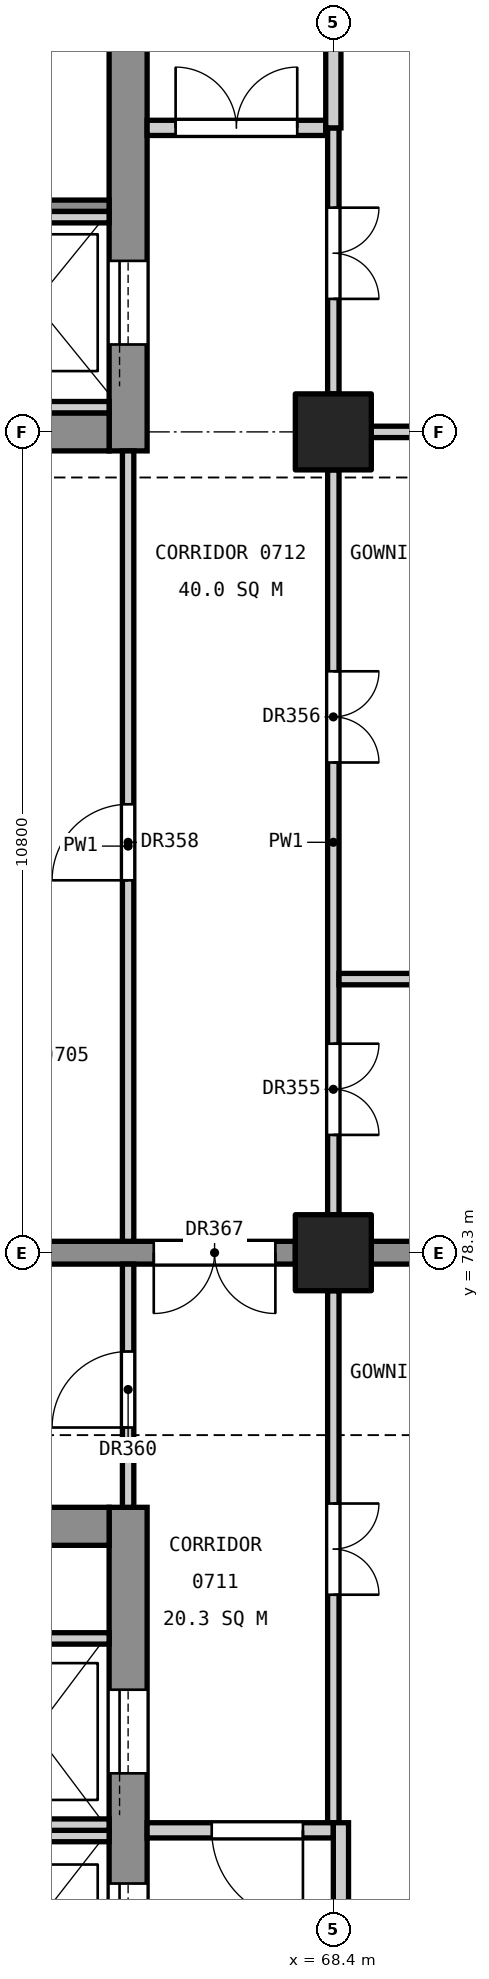
"""IFC4 building model, lengths in metres.
Left out: names, types, materials, properties, quantities, classifications, styles, units other than length and angle.
Written with IfcOpenShell. Run it as: python <this file> out.ifc"""

import sys

from ifc_helpers import new_model, si_unit, direction, frame, frame_2d, origin, origin_2d, place, context, subcontext, project, spatial, rectangle, extrude, element, fill, save


model = new_model("IFC4")
c1 = context("Model", 3, precision=1e-05, world=origin(), true_north=direction((0.0, 1.0)))
c2 = subcontext(c1, "Body", "Model", "MODEL_VIEW")
j1 = project(units=[si_unit("LENGTHUNIT", "METRE"), si_unit("PLANEANGLEUNIT", "RADIAN")], contexts=[c1])
p1 = place(None, origin())
s1 = spatial("IfcSite", under=j1, at=p1, CompositionType="ELEMENT")
p2 = place(p1, origin())
s2 = spatial("IfcBuilding", under=s1, at=p2, CompositionType="ELEMENT")
p3 = place(p2, frame((0.0, 0.0, 36.6)))
s3 = spatial("IfcBuildingStorey", under=s2, at=p3, CompositionType="ELEMENT", Elevation=36.6)
for number, where, z_axis, x_axis in (
    (1, (68.4, 78.3, 0.0), (0.0, 0.0, 1.0), (1.0, 0.0, 0.0)),
    (2, (68.4, 89.1, 0.0), (0.0, 0.0, 1.0), (1.0, 0.0, 0.0)),
):
    element("IfcColumn", number, at=place(p3, frame(where, z_axis=z_axis, x_axis=x_axis)), inside=s3, PredefinedType="COLUMN", context=c2, shape_type="SweptSolid", body=[
        extrude(rectangle(XDim=1.0, YDim=1.0, at=origin_2d()), origin(), (0.0, 0.0, 1.0), 4.8),
    ])
p4 = place(p3, frame((65.7, 60.05, 0.0), z_axis=(0.0, 0.0, 1.0), x_axis=(0.0, 1.0, 0.0)))
e3 = element("IfcWall", 3, at=p4, inside=s3, PredefinedType="SHEAR", context=c2, shape_type="SweptSolid", body=[
    extrude(rectangle(XDim=14.9, YDim=0.5, at=frame_2d((7.45, 0.0))), origin(), (0.0, 0.0, 1.0), 4.55),
])
p5 = place(p4, frame((0.55, 0.0, 0.0)))
e4 = element("IfcOpeningElement", 4, at=p5, cuts=e3, PredefinedType="OPENING", context=c2, shape_type="SweptSolid", body=[
    extrude(rectangle(XDim=1.4, YDim=2.1, at=frame_2d((0.7, 1.05))), frame((0.0, 0.26, 0.0), z_axis=(0.0, -1.0, 0.0), x_axis=(1.0, 0.0, 0.0)), (0.0, 0.0, 1.0), 0.52),
])
p6 = place(p4, frame((8.85, 0.0, 0.0)))
e5 = element("IfcOpeningElement", 5, at=p6, cuts=e3, PredefinedType="OPENING", context=c2, shape_type="SweptSolid", body=[
    extrude(rectangle(XDim=1.1, YDim=2.1, at=frame_2d((0.55, 1.05))), frame((0.0, 0.26, 0.0), z_axis=(0.0, -1.0, 0.0), x_axis=(1.0, 0.0, 0.0)), (0.0, 0.0, 1.0), 0.52),
])
p7 = place(p4, frame((11.4, 0.0, 0.0)))
e6 = element("IfcOpeningElement", 6, at=p7, cuts=e3, PredefinedType="OPENING", context=c2, shape_type="SweptSolid", body=[
    extrude(rectangle(XDim=1.1, YDim=2.1, at=frame_2d((0.55, 1.05))), frame((0.0, 0.26, 0.0), z_axis=(0.0, -1.0, 0.0), x_axis=(1.0, 0.0, 0.0)), (0.0, 0.0, 1.0), 0.52),
])
p8 = place(p3, frame((61.45, 74.7, 0.0), z_axis=(0.0, 0.0, 1.0), x_axis=(1.0, 0.0, 0.0)))
e7 = element("IfcWall", 7, at=p8, inside=s3, PredefinedType="SHEAR", context=c2, shape_type="SweptSolid", body=[
    extrude(rectangle(XDim=4.0, YDim=0.5, at=frame_2d((2.0, 0.0))), origin(), (0.0, 0.0, 1.0), 4.55),
])
p9 = place(p3, frame((65.7, 88.85, 0.0), z_axis=(0.0, 0.0, 1.0), x_axis=(0.0, 1.0, 0.0)))
e8 = element("IfcWall", 8, at=p9, inside=s3, PredefinedType="SHEAR", context=c2, shape_type="SweptSolid", body=[
    extrude(rectangle(XDim=11.3, YDim=0.5, at=frame_2d((5.65, 0.0))), origin(), (0.0, 0.0, 1.0), 4.55),
])
p10 = place(p9, frame((9.35, 0.0, 0.0)))
e9 = element("IfcOpeningElement", 9, at=p10, cuts=e8, PredefinedType="OPENING", context=c2, shape_type="SweptSolid", body=[
    extrude(rectangle(XDim=1.4, YDim=2.1, at=frame_2d((0.7, 1.05))), frame((0.0, 0.26, 0.0), z_axis=(0.0, -1.0, 0.0), x_axis=(1.0, 0.0, 0.0)), (0.0, 0.0, 1.0), 0.52),
])
p11 = place(p9, frame((1.4, 0.0, 0.0)))
e10 = element("IfcOpeningElement", 10, at=p11, cuts=e8, PredefinedType="OPENING", context=c2, shape_type="SweptSolid", body=[
    extrude(rectangle(XDim=1.1, YDim=2.1, at=frame_2d((0.55, 1.05))), frame((0.0, 0.26, 0.0), z_axis=(0.0, -1.0, 0.0), x_axis=(1.0, 0.0, 0.0)), (0.0, 0.0, 1.0), 0.52),
])
p12 = place(p3, frame((61.45, 89.1, 0.0), z_axis=(0.0, 0.0, 1.0), x_axis=(1.0, 0.0, 0.0)))
e11 = element("IfcWall", 11, at=p12, inside=s3, PredefinedType="SHEAR", context=c2, shape_type="SweptSolid", body=[
    extrude(rectangle(XDim=4.0, YDim=0.5, at=frame_2d((2.0, 0.0))), origin(), (0.0, 0.0, 1.0), 4.55),
])
p13 = place(p3, frame((61.7, 78.3, 0.0), z_axis=(0.0, 0.0, 1.0), x_axis=(1.0, 0.0, 0.0)))
e12 = element("IfcWall", 12, at=p13, inside=s3, PredefinedType="SHEAR", context=c2, shape_type="SweptSolid", body=[
    extrude(rectangle(XDim=6.2, YDim=0.3, at=frame_2d((3.1, 0.0))), origin(), (0.0, 0.0, 1.0), 4.55),
])
p14 = place(p13, frame((4.337, 0.0, 0.0)))
e13 = element("IfcOpeningElement", 13, at=p14, cuts=e12, PredefinedType="OPENING", context=c2, shape_type="SweptSolid", body=[
    extrude(rectangle(XDim=1.6, YDim=2.1, at=frame_2d((0.8, 1.05))), frame((0.0, 0.16, 0.0), z_axis=(0.0, -1.0, 0.0), x_axis=(1.0, 0.0, 0.0)), (0.0, 0.0, 1.0), 0.32),
])
p15 = place(p3, frame((68.9, 78.3, 0.0), z_axis=(0.0, 0.0, 1.0), x_axis=(1.0, 0.0, 0.0)))
e14 = element("IfcWall", 14, at=p15, inside=s3, PredefinedType="SHEAR", context=c2, shape_type="SweptSolid", body=[
    extrude(rectangle(XDim=9.8, YDim=0.3, at=frame_2d((4.9, 0.0))), origin(), (0.0, 0.0, 1.0), 4.55),
])
p16 = place(p3, frame((61.45, 92.075, 0.0), z_axis=(0.0, 0.0, 1.0), x_axis=(1.0, 0.0, 0.0)))
e15 = element("IfcWall", 15, at=p16, inside=s3, PredefinedType="SOLIDWALL", context=c2, shape_type="SweptSolid", body=[
    extrude(rectangle(XDim=4.0, YDim=0.15, at=frame_2d((2.0, 0.0))), origin(), (0.0, 0.0, 1.0), 4.55),
])
for number, where, z_axis, x_axis in (
    (16, (63.65, 70.625, 0.0), (0.0, 0.0, 1.0), (1.0, 0.0, 0.0)),
    (17, (63.65, 70.775, 0.0), (0.0, 0.0, 1.0), (1.0, 0.0, 0.0)),
    (18, (63.65, 73.225, 0.0), (0.0, 0.0, 1.0), (1.0, 0.0, 0.0)),
    (19, (63.65, 91.925, 0.0), (0.0, 0.0, 1.0), (1.0, 0.0, 0.0)),
    (20, (63.65, 89.425, 0.0), (0.0, 0.0, 1.0), (1.0, 0.0, 0.0)),
):
    element("IfcWall", number, at=place(p3, frame(where, z_axis=z_axis, x_axis=x_axis)), inside=s3, PredefinedType="SOLIDWALL", context=c2, shape_type="SweptSolid", body=[
        extrude(rectangle(XDim=1.8, YDim=0.15, at=frame_2d((0.9, 0.0))), origin(), (0.0, 0.0, 1.0), 4.8),
    ])
p17 = place(p3, frame((65.7, 74.95, 0.0), z_axis=(0.0, 0.0, 1.0), x_axis=(0.0, 1.0, 0.0)))
e21 = element("IfcWall", 21, at=p17, inside=s3, PredefinedType="PARTITIONING", context=c2, shape_type="SweptSolid", body=[
    extrude(rectangle(XDim=3.2, YDim=0.15, at=frame_2d((1.6, 0.0))), origin(), (0.0, 0.0, 1.0), 3.55),
])
p18 = place(p17, frame((1.05, 0.0, 0.0)))
e22 = element("IfcOpeningElement", 22, at=p18, cuts=e21, PredefinedType="OPENING", context=c2, shape_type="SweptSolid", body=[
    extrude(rectangle(XDim=1.0, YDim=2.1, at=frame_2d((0.5, 1.05))), frame((0.0, 0.085, 0.0), z_axis=(0.0, -1.0, 0.0), x_axis=(1.0, 0.0, 0.0)), (0.0, 0.0, 1.0), 0.17),
])
p19 = place(p3, frame((65.7, 78.45, 0.0), z_axis=(0.0, 0.0, 1.0), x_axis=(0.0, 1.0, 0.0)))
e23 = element("IfcWall", 23, at=p19, inside=s3, PredefinedType="PARTITIONING", context=c2, shape_type="SweptSolid", body=[
    extrude(rectangle(XDim=10.4, YDim=0.15, at=frame_2d((5.2, 0.0))), origin(), (0.0, 0.0, 1.0), 3.55),
])
p20 = place(p19, frame((4.75, 0.0, 0.0)))
e24 = element("IfcOpeningElement", 24, at=p20, cuts=e23, PredefinedType="OPENING", context=c2, shape_type="SweptSolid", body=[
    extrude(rectangle(XDim=1.0, YDim=2.1, at=frame_2d((0.5, 1.05))), frame((0.0, 0.085, 0.0), z_axis=(0.0, -1.0, 0.0), x_axis=(1.0, 0.0, 0.0)), (0.0, 0.0, 1.0), 0.17),
])
p21 = place(p3, frame((65.95, 93.1, 0.0), z_axis=(0.0, 0.0, 1.0), x_axis=(1.0, 0.0, 0.0)))
e25 = element("IfcWall", 25, at=p21, inside=s3, PredefinedType="PARTITIONING", context=c2, shape_type="SweptSolid", body=[
    extrude(rectangle(XDim=2.35, YDim=0.2, at=frame_2d((1.175, 0.0))), origin(), (0.0, 0.0, 1.0), 3.55),
])
p22 = place(p21, frame((0.375, 0.0, 0.0)))
e26 = element("IfcOpeningElement", 26, at=p22, cuts=e25, PredefinedType="OPENING", context=c2, shape_type="SweptSolid", body=[
    extrude(rectangle(XDim=1.6, YDim=2.1, at=frame_2d((0.8, 1.05))), frame((0.0, 0.11, 0.0), z_axis=(0.0, -1.0, 0.0), x_axis=(1.0, 0.0, 0.0)), (0.0, 0.0, 1.0), 0.22),
])
p23 = place(p3, frame((68.4, 70.8, 0.0), z_axis=(0.0, 0.0, 1.0), x_axis=(0.0, 1.0, 0.0)))
e27 = element("IfcWall", 27, at=p23, inside=s3, PredefinedType="PARTITIONING", context=c2, shape_type="SweptSolid", body=[
    extrude(rectangle(XDim=7.0, YDim=0.15, at=frame_2d((3.5, 0.0))), origin(), (0.0, 0.0, 1.0), 3.55),
])
p24 = place(p23, frame((3.0, 0.0, 0.0)))
e28 = element("IfcOpeningElement", 28, at=p24, cuts=e27, PredefinedType="OPENING", context=c2, shape_type="SweptSolid", body=[
    extrude(rectangle(XDim=1.2, YDim=2.1, at=frame_2d((0.6, 1.05))), frame((0.0, 0.085, 0.0), z_axis=(0.0, -1.0, 0.0), x_axis=(1.0, 0.0, 0.0)), (0.0, 0.0, 1.0), 0.17),
])
p25 = place(p3, frame((68.4, 78.8, 0.0), z_axis=(0.0, 0.0, 1.0), x_axis=(0.0, 1.0, 0.0)))
e29 = element("IfcWall", 29, at=p25, inside=s3, PredefinedType="PARTITIONING", context=c2, shape_type="SweptSolid", body=[
    extrude(rectangle(XDim=9.8, YDim=0.15, at=frame_2d((4.9, 0.0))), origin(), (0.0, 0.0, 1.0), 3.55),
])
p26 = place(p25, frame((1.05, 0.0, 0.0)))
e30 = element("IfcOpeningElement", 30, at=p26, cuts=e29, PredefinedType="OPENING", context=c2, shape_type="SweptSolid", body=[
    extrude(rectangle(XDim=1.2, YDim=2.1, at=frame_2d((0.6, 1.05))), frame((0.0, 0.085, 0.0), z_axis=(0.0, -1.0, 0.0), x_axis=(1.0, 0.0, 0.0)), (0.0, 0.0, 1.0), 0.17),
])
p27 = place(p25, frame((5.95, 0.0, 0.0)))
e31 = element("IfcOpeningElement", 31, at=p27, cuts=e29, PredefinedType="OPENING", context=c2, shape_type="SweptSolid", body=[
    extrude(rectangle(XDim=1.2, YDim=2.1, at=frame_2d((0.6, 1.05))), frame((0.0, 0.085, 0.0), z_axis=(0.0, -1.0, 0.0), x_axis=(1.0, 0.0, 0.0)), (0.0, 0.0, 1.0), 0.17),
])
p28 = place(p3, frame((68.4, 89.6, 0.0), z_axis=(0.0, 0.0, 1.0), x_axis=(0.0, 1.0, 0.0)))
e32 = element("IfcWall", 32, at=p28, inside=s3, PredefinedType="PARTITIONING", context=c2, shape_type="SweptSolid", body=[
    extrude(rectangle(XDim=3.5, YDim=0.15, at=frame_2d((1.75, 0.0))), origin(), (0.0, 0.0, 1.0), 3.55),
])
p29 = place(p28, frame((1.25, 0.0, 0.0)))
e33 = element("IfcOpeningElement", 33, at=p29, cuts=e32, PredefinedType="OPENING", context=c2, shape_type="SweptSolid", body=[
    extrude(rectangle(XDim=1.2, YDim=2.1, at=frame_2d((0.6, 1.05))), frame((0.0, 0.085, 0.0), z_axis=(0.0, -1.0, 0.0), x_axis=(1.0, 0.0, 0.0)), (0.0, 0.0, 1.0), 0.17),
])
p30 = place(p3, frame((68.4, 93.1, 0.0), z_axis=(0.0, 0.0, 1.0), x_axis=(0.0, 1.0, 0.0)))
e34 = element("IfcWall", 34, at=p30, inside=s3, PredefinedType="PARTITIONING", context=c2, shape_type="SweptSolid", body=[
    extrude(rectangle(XDim=6.3, YDim=0.2, at=frame_2d((3.15, 0.0))), origin(), (0.0, 0.0, 1.0), 3.55),
])
p31 = place(p3, frame((65.95, 70.7, 0.0), z_axis=(0.0, 0.0, 1.0), x_axis=(1.0, 0.0, 0.0)))
e35 = element("IfcWall", 35, at=p31, inside=s3, PredefinedType="PARTITIONING", context=c2, shape_type="SweptSolid", body=[
    extrude(rectangle(XDim=2.45, YDim=0.2, at=frame_2d((1.225, 0.0))), origin(), (0.0, 0.0, 1.0), 3.55),
])
p32 = place(p31, frame((0.85, 0.0, 0.0)))
e36 = element("IfcOpeningElement", 36, at=p32, cuts=e35, PredefinedType="OPENING", context=c2, shape_type="SweptSolid", body=[
    extrude(rectangle(XDim=1.2, YDim=2.1, at=frame_2d((0.6, 1.05))), frame((0.0, 0.11, 0.0), z_axis=(0.0, -1.0, 0.0), x_axis=(1.0, 0.0, 0.0)), (0.0, 0.0, 1.0), 0.22),
])
p33 = place(p3, frame((68.5, 68.0, 0.0), z_axis=(0.0, 0.0, 1.0), x_axis=(0.0, 1.0, 0.0)))
e37 = element("IfcWall", 37, at=p33, inside=s3, PredefinedType="PARTITIONING", context=c2, shape_type="SweptSolid", body=[
    extrude(rectangle(XDim=2.8, YDim=0.2, at=frame_2d((1.4, 0.0))), origin(), (0.0, 0.0, 1.0), 3.55),
])
p34 = place(p3, frame((68.475, 81.9, 0.0), z_axis=(0.0, 0.0, 1.0), x_axis=(1.0, 0.0, 0.0)))
e38 = element("IfcWall", 38, at=p34, inside=s3, PredefinedType="PARTITIONING", context=c2, shape_type="SweptSolid", body=[
    extrude(rectangle(XDim=10.575, YDim=0.15, at=frame_2d((5.288, 0.0))), origin(), (0.0, 0.0, 1.0), 3.85),
])
p35 = place(p3, frame((68.9, 89.1, 0.0), z_axis=(0.0, 0.0, 1.0), x_axis=(1.0, 0.0, 0.0)))
e39 = element("IfcWall", 39, at=p35, inside=s3, PredefinedType="PARTITIONING", context=c2, shape_type="SweptSolid", body=[
    extrude(rectangle(XDim=9.8, YDim=0.15, at=frame_2d((4.9, 0.0))), origin(), (0.0, 0.0, 1.0), 3.85),
])
p36 = place(p6, origin())
e40 = element("IfcDoor", 40, at=p36, inside=s3, OperationType="SLIDING_TO_LEFT", PredefinedType="DOOR", context=c2, shape_type="SweptSolid", body=[
    extrude(rectangle(XDim=1.1, YDim=2.1, at=frame_2d((0.55, 1.05))), frame((0.0, 0.025, 0.0), z_axis=(0.0, -1.0, 0.0), x_axis=(1.0, 0.0, 0.0)), (0.0, 0.0, 1.0), 0.05),
])
fill(e5, e40)
p37 = place(p7, origin())
e41 = element("IfcDoor", 41, at=p37, inside=s3, OperationType="SLIDING_TO_LEFT", PredefinedType="DOOR", context=c2, shape_type="SweptSolid", body=[
    extrude(rectangle(XDim=1.1, YDim=2.1, at=frame_2d((0.55, 1.05))), frame((0.0, 0.025, 0.0), z_axis=(0.0, -1.0, 0.0), x_axis=(1.0, 0.0, 0.0)), (0.0, 0.0, 1.0), 0.05),
])
fill(e6, e41)
p38 = place(p11, origin())
e42 = element("IfcDoor", 42, at=p38, inside=s3, OperationType="SLIDING_TO_LEFT", PredefinedType="DOOR", context=c2, shape_type="SweptSolid", body=[
    extrude(rectangle(XDim=1.1, YDim=2.1, at=frame_2d((0.55, 1.05))), frame((0.0, 0.025, 0.0), z_axis=(0.0, -1.0, 0.0), x_axis=(1.0, 0.0, 0.0)), (0.0, 0.0, 1.0), 0.05),
])
fill(e10, e42)
p39 = place(p24, frame((1.2, 0.0, 0.0), z_axis=(0.0, 0.0, 1.0), x_axis=(-1.0, 0.0, 0.0)))
e43 = element("IfcDoor", 43, at=p39, inside=s3, OperationType="DOUBLE_DOOR_SINGLE_SWING", PredefinedType="DOOR", context=c2, shape_type="SweptSolid", body=[
    extrude(rectangle(XDim=1.2, YDim=2.1, at=frame_2d((0.6, 1.05))), frame((0.0, 0.025, 0.0), z_axis=(0.0, -1.0, 0.0), x_axis=(1.0, 0.0, 0.0)), (0.0, 0.0, 1.0), 0.05),
])
fill(e28, e43)
p40 = place(p26, frame((1.2, 0.0, 0.0), z_axis=(0.0, 0.0, 1.0), x_axis=(-1.0, 0.0, 0.0)))
e44 = element("IfcDoor", 44, at=p40, inside=s3, OperationType="DOUBLE_DOOR_SINGLE_SWING", PredefinedType="DOOR", context=c2, shape_type="SweptSolid", body=[
    extrude(rectangle(XDim=1.2, YDim=2.1, at=frame_2d((0.6, 1.05))), frame((0.0, 0.025, 0.0), z_axis=(0.0, -1.0, 0.0), x_axis=(1.0, 0.0, 0.0)), (0.0, 0.0, 1.0), 0.05),
])
fill(e30, e44)
p41 = place(p27, frame((1.2, 0.0, 0.0), z_axis=(0.0, 0.0, 1.0), x_axis=(-1.0, 0.0, 0.0)))
e45 = element("IfcDoor", 45, at=p41, inside=s3, OperationType="DOUBLE_DOOR_SINGLE_SWING", PredefinedType="DOOR", context=c2, shape_type="SweptSolid", body=[
    extrude(rectangle(XDim=1.2, YDim=2.1, at=frame_2d((0.6, 1.05))), frame((0.0, 0.025, 0.0), z_axis=(0.0, -1.0, 0.0), x_axis=(1.0, 0.0, 0.0)), (0.0, 0.0, 1.0), 0.05),
])
fill(e31, e45)
p42 = place(p29, frame((1.2, 0.0, 0.0), z_axis=(0.0, 0.0, 1.0), x_axis=(-1.0, 0.0, 0.0)))
e46 = element("IfcDoor", 46, at=p42, inside=s3, OperationType="DOUBLE_DOOR_SINGLE_SWING", PredefinedType="DOOR", context=c2, shape_type="SweptSolid", body=[
    extrude(rectangle(XDim=1.2, YDim=2.1, at=frame_2d((0.6, 1.05))), frame((0.0, 0.025, 0.0), z_axis=(0.0, -1.0, 0.0), x_axis=(1.0, 0.0, 0.0)), (0.0, 0.0, 1.0), 0.05),
])
fill(e33, e46)
p43 = place(p20, origin())
e47 = element("IfcDoor", 47, at=p43, inside=s3, OperationType="SINGLE_SWING_LEFT", PredefinedType="DOOR", context=c2, shape_type="SweptSolid", body=[
    extrude(rectangle(XDim=1.0, YDim=2.1, at=frame_2d((0.5, 1.05))), frame((0.0, 0.025, 0.0), z_axis=(0.0, -1.0, 0.0), x_axis=(1.0, 0.0, 0.0)), (0.0, 0.0, 1.0), 0.05),
])
fill(e24, e47)
p44 = place(p18, origin())
e48 = element("IfcDoor", 48, at=p44, inside=s3, OperationType="SINGLE_SWING_LEFT", PredefinedType="DOOR", context=c2, shape_type="SweptSolid", body=[
    extrude(rectangle(XDim=1.0, YDim=2.1, at=frame_2d((0.5, 1.05))), frame((0.0, 0.025, 0.0), z_axis=(0.0, -1.0, 0.0), x_axis=(1.0, 0.0, 0.0)), (0.0, 0.0, 1.0), 0.05),
])
fill(e22, e48)
p45 = place(p32, frame((1.2, 0.0, 0.0), z_axis=(0.0, 0.0, 1.0), x_axis=(-1.0, 0.0, 0.0)))
e49 = element("IfcDoor", 49, at=p45, inside=s3, OperationType="SINGLE_SWING_LEFT", PredefinedType="DOOR", context=c2, shape_type="SweptSolid", body=[
    extrude(rectangle(XDim=1.2, YDim=2.1, at=frame_2d((0.6, 1.05))), frame((0.0, 0.025, 0.0), z_axis=(0.0, -1.0, 0.0), x_axis=(1.0, 0.0, 0.0)), (0.0, 0.0, 1.0), 0.05),
])
fill(e36, e49)
p46 = place(p22, origin())
e50 = element("IfcDoor", 50, at=p46, inside=s3, OperationType="DOUBLE_DOOR_SINGLE_SWING", PredefinedType="DOOR", context=c2, shape_type="SweptSolid", body=[
    extrude(rectangle(XDim=1.6, YDim=2.1, at=frame_2d((0.8, 1.05))), frame((0.0, 0.025, 0.0), z_axis=(0.0, -1.0, 0.0), x_axis=(1.0, 0.0, 0.0)), (0.0, 0.0, 1.0), 0.05),
])
fill(e26, e50)
p47 = place(p14, frame((1.6, 0.0, 0.0), z_axis=(0.0, 0.0, 1.0), x_axis=(-1.0, 0.0, 0.0)))
e51 = element("IfcDoor", 51, at=p47, inside=s3, OperationType="DOUBLE_DOOR_SINGLE_SWING", PredefinedType="DOOR", context=c2, shape_type="SweptSolid", body=[
    extrude(rectangle(XDim=1.6, YDim=2.1, at=frame_2d((0.8, 1.05))), frame((0.0, 0.025, 0.0), z_axis=(0.0, -1.0, 0.0), x_axis=(1.0, 0.0, 0.0)), (0.0, 0.0, 1.0), 0.05),
])
fill(e13, e51)
save(model, sys.argv[1])
